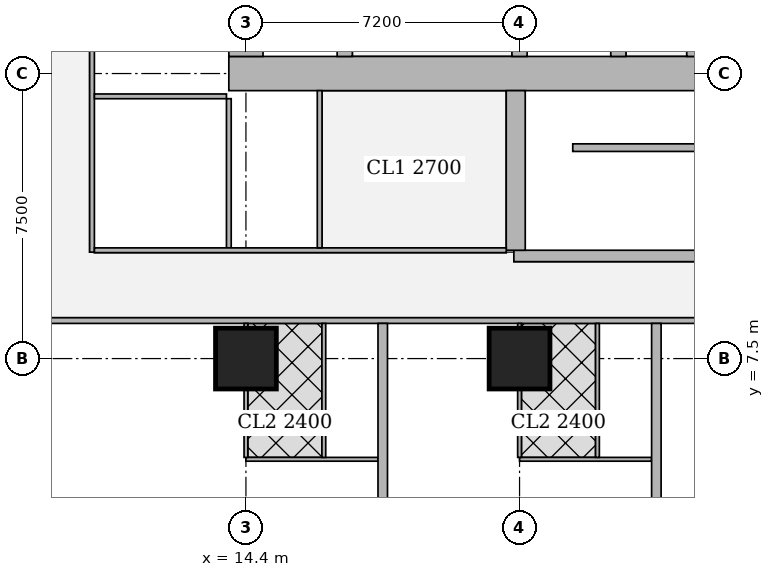
"""IFC4 building model, lengths in metres.
Left out: names, types, materials, properties, quantities, classifications, styles, units other than length and angle.
Written with IfcOpenShell. Run it as: python <this file> out.ifc"""

import sys

from ifc_helpers import new_model, si_unit, direction, frame, frame_2d, origin, origin_2d, place, context, subcontext, project, spatial, rectangle, extrude, element, fill, save


model = new_model("IFC4")
c1 = context("Model", 3, precision=1e-05, world=origin(), true_north=direction((0.0, 1.0)))
c2 = subcontext(c1, "Body", "Model", "MODEL_VIEW")
j1 = project(units=[si_unit("LENGTHUNIT", "METRE"), si_unit("PLANEANGLEUNIT", "RADIAN")], contexts=[c1])
p1 = place(None, origin())
s1 = spatial("IfcSite", under=j1, at=p1, CompositionType="ELEMENT")
p2 = place(p1, origin())
s2 = spatial("IfcBuilding", under=s1, at=p2, CompositionType="ELEMENT")
p3 = place(p2, frame((0.0, 0.0, 89.15)))
s3 = spatial("IfcBuildingStorey", under=s2, at=p3, CompositionType="ELEMENT", Elevation=89.15)
for number, where, z_axis, x_axis in (
    (1, (14.4, 7.5, 0.0), (0.0, 0.0, 1.0), (1.0, 0.0, 0.0)),
    (2, (21.6, 7.5, 0.0), (0.0, 0.0, 1.0), (1.0, 0.0, 0.0)),
):
    element("IfcColumn", number, at=place(p3, frame(where, z_axis=z_axis, x_axis=x_axis)), inside=s3, PredefinedType="COLUMN", context=c2, shape_type="SweptSolid", body=[
        extrude(rectangle(XDim=1.6, YDim=1.6, at=origin_2d()), origin(), (0.0, 0.0, 1.0), 3.75),
    ])
p4 = place(p3, frame((13.95, 15.0, 0.0), z_axis=(0.0, 0.0, 1.0), x_axis=(1.0, 0.0, 0.0)))
e3 = element("IfcWall", 3, at=p4, inside=s3, PredefinedType="SHEAR", context=c2, shape_type="SweptSolid", body=[
    extrude(rectangle(XDim=15.3, YDim=0.9, at=frame_2d((7.65, 0.0))), origin(), (0.0, 0.0, 1.0), 3.75),
])
p5 = place(p4, frame((4.45, 0.0, 0.0)))
e4 = element("IfcOpeningElement", 4, at=p5, cuts=e3, PredefinedType="OPENING", context=c2, shape_type="SweptSolid", body=[
    extrude(rectangle(XDim=1.8, YDim=2.1, at=frame_2d((0.9, 1.05))), frame((0.0, 0.46, 0.0), z_axis=(0.0, -1.0, 0.0), x_axis=(1.0, 0.0, 0.0)), (0.0, 0.0, 1.0), 0.92),
])
p6 = place(p4, frame((10.7, 0.0, 0.0)))
e5 = element("IfcOpeningElement", 5, at=p6, cuts=e3, PredefinedType="OPENING", context=c2, shape_type="SweptSolid", body=[
    extrude(rectangle(XDim=1.1, YDim=2.1, at=frame_2d((0.55, 1.05))), frame((0.0, 0.46, 0.0), z_axis=(0.0, -1.0, 0.0), x_axis=(1.0, 0.0, 0.0)), (0.0, 0.0, 1.0), 0.92),
])
p7 = place(p3, frame((14.4, 15.45, 0.0), z_axis=(0.0, 0.0, 1.0), x_axis=(0.0, 1.0, 0.0)))
e6 = element("IfcWall", 6, at=p7, inside=s3, PredefinedType="SHEAR", context=c2, shape_type="SweptSolid", body=[
    extrude(rectangle(XDim=14.1, YDim=0.9, at=frame_2d((7.05, 0.0))), origin(), (0.0, 0.0, 1.0), 3.75),
])
p8 = place(p3, frame((17.0, 15.45, 0.0), z_axis=(0.0, 0.0, 1.0), x_axis=(0.0, 1.0, 0.0)))
e7 = element("IfcWall", 7, at=p8, inside=s3, PredefinedType="SHEAR", context=c2, shape_type="SweptSolid", body=[
    extrude(rectangle(XDim=14.1, YDim=0.4, at=frame_2d((7.05, 0.0))), origin(), (0.0, 0.0, 1.0), 3.75),
])
p9 = place(p8, frame((0.875, 0.0, 0.0)))
e8 = element("IfcOpeningElement", 8, at=p9, cuts=e7, PredefinedType="OPENING", context=c2, shape_type="SweptSolid", body=[
    extrude(rectangle(XDim=1.1, YDim=2.1, at=frame_2d((0.55, 1.05))), frame((0.0, 0.21, 0.0), z_axis=(0.0, -1.0, 0.0), x_axis=(1.0, 0.0, 0.0)), (0.0, 0.0, 1.0), 0.42),
])
p10 = place(p8, frame((4.625, 0.0, 0.0)))
e9 = element("IfcOpeningElement", 9, at=p10, cuts=e7, PredefinedType="OPENING", context=c2, shape_type="SweptSolid", body=[
    extrude(rectangle(XDim=1.1, YDim=2.1, at=frame_2d((0.55, 1.05))), frame((0.0, 0.21, 0.0), z_axis=(0.0, -1.0, 0.0), x_axis=(1.0, 0.0, 0.0)), (0.0, 0.0, 1.0), 0.42),
])
p11 = place(p8, frame((8.375, 0.0, 0.0)))
e10 = element("IfcOpeningElement", 10, at=p11, cuts=e7, PredefinedType="OPENING", context=c2, shape_type="SweptSolid", body=[
    extrude(rectangle(XDim=1.1, YDim=2.1, at=frame_2d((0.55, 1.05))), frame((0.0, 0.21, 0.0), z_axis=(0.0, -1.0, 0.0), x_axis=(1.0, 0.0, 0.0)), (0.0, 0.0, 1.0), 0.42),
])
p12 = place(p8, frame((12.125, 0.0, 0.0)))
e11 = element("IfcOpeningElement", 11, at=p12, cuts=e7, PredefinedType="OPENING", context=c2, shape_type="SweptSolid", body=[
    extrude(rectangle(XDim=1.1, YDim=2.1, at=frame_2d((0.55, 1.05))), frame((0.0, 0.21, 0.0), z_axis=(0.0, -1.0, 0.0), x_axis=(1.0, 0.0, 0.0)), (0.0, 0.0, 1.0), 0.42),
])
for number, where, z_axis, x_axis in (
    (12, (21.6, 15.45, 0.0), (0.0, 0.0, 1.0), (0.0, 1.0, 0.0)),
    (13, (24.2, 15.45, 0.0), (0.0, 0.0, 1.0), (0.0, 1.0, 0.0)),
):
    element("IfcWall", number, at=place(p3, frame(where, z_axis=z_axis, x_axis=x_axis)), inside=s3, PredefinedType="SHEAR", context=c2, shape_type="SweptSolid", body=[
        extrude(rectangle(XDim=14.1, YDim=0.4, at=frame_2d((7.05, 0.0))), origin(), (0.0, 0.0, 1.0), 3.75),
    ])
p13 = place(p3, frame((26.2, 15.45, 0.0), z_axis=(0.0, 0.0, 1.0), x_axis=(0.0, 1.0, 0.0)))
e14 = element("IfcWall", 14, at=p13, inside=s3, PredefinedType="SHEAR", context=c2, shape_type="SweptSolid", body=[
    extrude(rectangle(XDim=3.1, YDim=0.4, at=frame_2d((1.55, 0.0))), origin(), (0.0, 0.0, 1.0), 3.75),
])
p14 = place(p13, frame((0.825, 0.0, 0.0)))
e15 = element("IfcOpeningElement", 15, at=p14, cuts=e14, PredefinedType="OPENING", context=c2, shape_type="SweptSolid", body=[
    extrude(rectangle(XDim=1.2, YDim=2.1, at=frame_2d((0.6, 1.05))), frame((0.0, 0.21, 0.0), z_axis=(0.0, -1.0, 0.0), x_axis=(1.0, 0.0, 0.0)), (0.0, 0.0, 1.0), 0.42),
])
p15 = place(p3, frame((21.45, 10.2, 0.0), z_axis=(0.0, 0.0, 1.0), x_axis=(1.0, 0.0, 0.0)))
e16 = element("IfcWall", 16, at=p15, inside=s3, PredefinedType="SHEAR", context=c2, shape_type="SweptSolid", body=[
    extrude(rectangle(XDim=7.5, YDim=0.3, at=frame_2d((3.75, 0.0))), origin(), (0.0, 0.0, 1.0), 3.75),
])
p16 = place(p15, frame((0.5, 0.0, 0.0)))
e17 = element("IfcOpeningElement", 17, at=p16, cuts=e16, PredefinedType="OPENING", context=c2, shape_type="SweptSolid", body=[
    extrude(rectangle(XDim=1.1, YDim=2.1, at=frame_2d((0.55, 1.05))), frame((0.0, 0.16, 0.0), z_axis=(0.0, -1.0, 0.0), x_axis=(1.0, 0.0, 0.0)), (0.0, 0.0, 1.0), 0.32),
])
p17 = place(p3, frame((21.5, 10.35, 0.0), z_axis=(0.0, 0.0, 1.0), x_axis=(0.0, 1.0, 0.0)))
e18 = element("IfcWall", 18, at=p17, inside=s3, PredefinedType="SHEAR", context=c2, shape_type="SweptSolid", body=[
    extrude(rectangle(XDim=4.2, YDim=0.5, at=frame_2d((2.1, 0.0))), origin(), (0.0, 0.0, 1.0), 3.75),
])
p18 = place(p3, frame((40.053, 8.5, 0.0), z_axis=(0.0, 0.0, 1.0), x_axis=(-1.0, 0.0, 0.0)))
e19 = element("IfcWall", 19, at=p18, inside=s3, PredefinedType="SOLIDWALL", context=c2, shape_type="SweptSolid", body=[
    extrude(rectangle(XDim=31.703, YDim=0.15, at=frame_2d((15.852, 0.0))), origin(), (0.0, 0.0, 1.0), 3.5),
])
p19 = place(p18, frame((28.103, 0.0, 0.0)))
e20 = element("IfcOpeningElement", 20, at=p19, cuts=e19, PredefinedType="OPENING", context=c2, shape_type="SweptSolid", body=[
    extrude(rectangle(XDim=1.0, YDim=2.1, at=frame_2d((0.5, 1.05))), frame((0.0, 0.085, 0.0), z_axis=(0.0, -1.0, 0.0), x_axis=(1.0, 0.0, 0.0)), (0.0, 0.0, 1.0), 0.17),
])
p20 = place(p18, frame((19.953, 0.0, 0.0)))
e21 = element("IfcOpeningElement", 21, at=p20, cuts=e19, PredefinedType="OPENING", context=c2, shape_type="SweptSolid", body=[
    extrude(rectangle(XDim=1.0, YDim=2.1, at=frame_2d((0.5, 1.05))), frame((0.0, 0.085, 0.0), z_axis=(0.0, -1.0, 0.0), x_axis=(1.0, 0.0, 0.0)), (0.0, 0.0, 1.0), 0.17),
])
p21 = place(p18, frame((12.753, 0.0, 0.0)))
e22 = element("IfcOpeningElement", 22, at=p21, cuts=e19, PredefinedType="OPENING", context=c2, shape_type="SweptSolid", body=[
    extrude(rectangle(XDim=1.0, YDim=2.1, at=frame_2d((0.5, 1.05))), frame((0.0, 0.085, 0.0), z_axis=(0.0, -1.0, 0.0), x_axis=(1.0, 0.0, 0.0)), (0.0, 0.0, 1.0), 0.17),
])
p22 = place(p18, frame((0.15, 0.0, 0.0)))
e23 = element("IfcOpeningElement", 23, at=p22, cuts=e19, PredefinedType="OPENING", context=c2, shape_type="SweptSolid", body=[
    extrude(rectangle(XDim=1.0, YDim=2.1, at=frame_2d((0.5, 1.05))), frame((0.0, 0.085, 0.0), z_axis=(0.0, -1.0, 0.0), x_axis=(1.0, 0.0, 0.0)), (0.0, 0.0, 1.0), 0.17),
])
p23 = place(p3, frame((17.875, 4.85, 0.0), z_axis=(0.0, 0.0, 1.0), x_axis=(-1.0, 0.0, 0.0)))
e24 = element("IfcWall", 24, at=p23, inside=s3, PredefinedType="PARTITIONING", context=c2, shape_type="SweptSolid", body=[
    extrude(rectangle(XDim=3.475, YDim=0.1, at=frame_2d((1.738, 0.0))), origin(), (0.0, 0.0, 1.0), 3.5),
])
p24 = place(p23, frame((2.0, 0.0, 0.0)))
e25 = element("IfcOpeningElement", 25, at=p24, cuts=e24, PredefinedType="OPENING", context=c2, shape_type="SweptSolid", body=[
    extrude(rectangle(XDim=0.9, YDim=2.1, at=frame_2d((0.45, 1.05))), frame((0.0, 0.06, 0.0), z_axis=(0.0, -1.0, 0.0), x_axis=(1.0, 0.0, 0.0)), (0.0, 0.0, 1.0), 0.12),
])
p25 = place(p23, frame((0.2, 0.0, 0.0)))
e26 = element("IfcOpeningElement", 26, at=p25, cuts=e24, PredefinedType="OPENING", context=c2, shape_type="SweptSolid", body=[
    extrude(rectangle(XDim=0.9, YDim=2.1, at=frame_2d((0.45, 1.05))), frame((0.0, 0.06, 0.0), z_axis=(0.0, -1.0, 0.0), x_axis=(1.0, 0.0, 0.0)), (0.0, 0.0, 1.0), 0.12),
])
p26 = place(p3, frame((14.4, 4.9, 0.0), z_axis=(0.0, 0.0, 1.0), x_axis=(0.0, 1.0, 0.0)))
e27 = element("IfcWall", 27, at=p26, inside=s3, PredefinedType="PARTITIONING", context=c2, shape_type="SweptSolid", body=[
    extrude(rectangle(XDim=1.799, YDim=0.1, at=frame_2d((0.899, 0.0))), origin(), (0.0, 0.0, 1.0), 3.5),
])
p27 = place(p3, frame((14.4, 8.301, 0.0), z_axis=(0.0, 0.0, 1.0), x_axis=(0.0, 1.0, 0.0)))
e28 = element("IfcWall", 28, at=p27, inside=s3, PredefinedType="PARTITIONING", context=c2, shape_type="SweptSolid", body=[
    extrude(rectangle(XDim=0.124, YDim=0.1, at=frame_2d((0.062, 0.0))), origin(), (0.0, 0.0, 1.0), 3.5),
])
p28 = place(p3, frame((16.45, 4.9, 0.0), z_axis=(0.0, 0.0, 1.0), x_axis=(0.0, 1.0, 0.0)))
e29 = element("IfcWall", 29, at=p28, inside=s3, PredefinedType="PARTITIONING", context=c2, shape_type="SweptSolid", body=[
    extrude(rectangle(XDim=3.525, YDim=0.1, at=frame_2d((1.763, 0.0))), origin(), (0.0, 0.0, 1.0), 3.5),
])
p29 = place(p3, frame((25.075, 4.85, 0.0), z_axis=(0.0, 0.0, 1.0), x_axis=(-1.0, 0.0, 0.0)))
e30 = element("IfcWall", 30, at=p29, inside=s3, PredefinedType="PARTITIONING", context=c2, shape_type="SweptSolid", body=[
    extrude(rectangle(XDim=3.475, YDim=0.1, at=frame_2d((1.737, 0.0))), origin(), (0.0, 0.0, 1.0), 3.5),
])
p30 = place(p29, frame((2.0, 0.0, 0.0)))
e31 = element("IfcOpeningElement", 31, at=p30, cuts=e30, PredefinedType="OPENING", context=c2, shape_type="SweptSolid", body=[
    extrude(rectangle(XDim=0.9, YDim=2.1, at=frame_2d((0.45, 1.05))), frame((0.0, 0.06, 0.0), z_axis=(0.0, -1.0, 0.0), x_axis=(1.0, 0.0, 0.0)), (0.0, 0.0, 1.0), 0.12),
])
p31 = place(p29, frame((0.2, 0.0, 0.0)))
e32 = element("IfcOpeningElement", 32, at=p31, cuts=e30, PredefinedType="OPENING", context=c2, shape_type="SweptSolid", body=[
    extrude(rectangle(XDim=0.9, YDim=2.1, at=frame_2d((0.45, 1.05))), frame((0.0, 0.06, 0.0), z_axis=(0.0, -1.0, 0.0), x_axis=(1.0, 0.0, 0.0)), (0.0, 0.0, 1.0), 0.12),
])
p32 = place(p3, frame((21.6, 4.9, 0.0), z_axis=(0.0, 0.0, 1.0), x_axis=(0.0, 1.0, 0.0)))
e33 = element("IfcWall", 33, at=p32, inside=s3, PredefinedType="PARTITIONING", context=c2, shape_type="SweptSolid", body=[
    extrude(rectangle(XDim=1.799, YDim=0.1, at=frame_2d((0.899, 0.0))), origin(), (0.0, 0.0, 1.0), 3.5),
])
p33 = place(p3, frame((21.6, 8.301, 0.0), z_axis=(0.0, 0.0, 1.0), x_axis=(0.0, 1.0, 0.0)))
e34 = element("IfcWall", 34, at=p33, inside=s3, PredefinedType="PARTITIONING", context=c2, shape_type="SweptSolid", body=[
    extrude(rectangle(XDim=0.124, YDim=0.1, at=frame_2d((0.062, 0.0))), origin(), (0.0, 0.0, 1.0), 3.5),
])
p34 = place(p3, frame((23.65, 4.9, 0.0), z_axis=(0.0, 0.0, 1.0), x_axis=(0.0, 1.0, 0.0)))
e35 = element("IfcWall", 35, at=p34, inside=s3, PredefinedType="PARTITIONING", context=c2, shape_type="SweptSolid", body=[
    extrude(rectangle(XDim=3.525, YDim=0.1, at=frame_2d((1.763, 0.0))), origin(), (0.0, 0.0, 1.0), 3.5),
])
for number, where, z_axis, x_axis in (
    (36, (18.0, 3.65, 0.0), (0.0, 0.0, 1.0), (0.0, 1.0, 0.0)),
    (37, (25.2, 3.65, 0.0), (0.0, 0.0, 1.0), (0.0, 1.0, 0.0)),
):
    element("IfcWall", number, at=place(p3, frame(where, z_axis=z_axis, x_axis=x_axis)), inside=s3, PredefinedType="SOLIDWALL", context=c2, shape_type="SweptSolid", body=[
        extrude(rectangle(XDim=4.775, YDim=0.25, at=frame_2d((2.388, 0.0))), origin(), (0.0, 0.0, 1.0), 3.5),
    ])
p35 = place(p3, frame((10.35, 10.3, 0.0), z_axis=(0.0, 0.0, 1.0), x_axis=(0.0, 1.0, 0.0)))
e38 = element("IfcWall", 38, at=p35, inside=s3, PredefinedType="PARTITIONING", context=c2, shape_type="SweptSolid", body=[
    extrude(rectangle(XDim=24.4, YDim=0.125, at=frame_2d((12.2, 0.0))), origin(), (0.0, 0.0, 1.0), 3.5),
])
p36 = place(p35, frame((1.55, 0.0, 0.0)))
e39 = element("IfcOpeningElement", 39, at=p36, cuts=e38, PredefinedType="OPENING", context=c2, shape_type="SweptSolid", body=[
    extrude(rectangle(XDim=1.0, YDim=2.1, at=frame_2d((0.5, 1.05))), frame((0.0, 0.073, 0.0), z_axis=(0.0, -1.0, 0.0), x_axis=(1.0, 0.0, 0.0)), (0.0, 0.0, 1.0), 0.145),
])
p37 = place(p35, frame((6.6, 0.0, 0.0)))
e40 = element("IfcOpeningElement", 40, at=p37, cuts=e38, PredefinedType="OPENING", context=c2, shape_type="SweptSolid", body=[
    extrude(rectangle(XDim=1.0, YDim=2.1, at=frame_2d((0.5, 1.05))), frame((0.0, 0.073, 0.0), z_axis=(0.0, -1.0, 0.0), x_axis=(1.0, 0.0, 0.0)), (0.0, 0.0, 1.0), 0.145),
])
p38 = place(p35, frame((11.4, 0.0, 0.0)))
e41 = element("IfcOpeningElement", 41, at=p38, cuts=e38, PredefinedType="OPENING", context=c2, shape_type="SweptSolid", body=[
    extrude(rectangle(XDim=1.0, YDim=2.1, at=frame_2d((0.5, 1.05))), frame((0.0, 0.073, 0.0), z_axis=(0.0, -1.0, 0.0), x_axis=(1.0, 0.0, 0.0)), (0.0, 0.0, 1.0), 0.145),
])
p39 = place(p35, frame((18.55, 0.0, 0.0)))
e42 = element("IfcOpeningElement", 42, at=p39, cuts=e38, PredefinedType="OPENING", context=c2, shape_type="SweptSolid", body=[
    extrude(rectangle(XDim=1.0, YDim=2.1, at=frame_2d((0.5, 1.05))), frame((0.0, 0.073, 0.0), z_axis=(0.0, -1.0, 0.0), x_axis=(1.0, 0.0, 0.0)), (0.0, 0.0, 1.0), 0.145),
])
p40 = place(p3, frame((10.413, 14.4, 0.0), z_axis=(0.0, 0.0, 1.0), x_axis=(1.0, 0.0, 0.0)))
e43 = element("IfcWall", 43, at=p40, inside=s3, PredefinedType="PARTITIONING", context=c2, shape_type="SweptSolid", body=[
    extrude(rectangle(XDim=3.475, YDim=0.125, at=frame_2d((1.737, 0.0))), origin(), (0.0, 0.0, 1.0), 3.5),
])
p41 = place(p3, frame((13.95, 10.413, 0.0), z_axis=(0.0, 0.0, 1.0), x_axis=(0.0, 1.0, 0.0)))
e44 = element("IfcWall", 44, at=p41, inside=s3, PredefinedType="PARTITIONING", context=c2, shape_type="SweptSolid", body=[
    extrude(rectangle(XDim=3.925, YDim=0.125, at=frame_2d((1.962, 0.0))), origin(), (0.0, 0.0, 1.0), 3.5),
])
p42 = place(p3, frame((10.413, 10.35, 0.0), z_axis=(0.0, 0.0, 1.0), x_axis=(1.0, 0.0, 0.0)))
e45 = element("IfcWall", 45, at=p42, inside=s3, PredefinedType="PARTITIONING", context=c2, shape_type="SweptSolid", body=[
    extrude(rectangle(XDim=10.837, YDim=0.125, at=frame_2d((5.418, 0.0))), origin(), (0.0, 0.0, 1.0), 3.5),
])
p43 = place(p42, frame((7.582, 0.0, 0.0)))
e46 = element("IfcOpeningElement", 46, at=p43, cuts=e45, PredefinedType="OPENING", context=c2, shape_type="SweptSolid", body=[
    extrude(rectangle(XDim=1.8, YDim=2.1, at=frame_2d((0.9, 1.05))), frame((0.0, 0.073, 0.0), z_axis=(0.0, -1.0, 0.0), x_axis=(1.0, 0.0, 0.0)), (0.0, 0.0, 1.0), 0.145),
])
p44 = place(p3, frame((16.34, 10.413, 0.0), z_axis=(0.0, 0.0, 1.0), x_axis=(0.0, 1.0, 0.0)))
e47 = element("IfcWall", 47, at=p44, inside=s3, PredefinedType="PARTITIONING", context=c2, shape_type="SweptSolid", body=[
    extrude(rectangle(XDim=4.137, YDim=0.125, at=frame_2d((2.068, 0.0))), origin(), (0.0, 0.0, 1.0), 3.5),
])
p45 = place(p44, frame((1.512, 0.0, 0.0)))
e48 = element("IfcOpeningElement", 48, at=p45, cuts=e47, PredefinedType="OPENING", context=c2, shape_type="SweptSolid", body=[
    extrude(rectangle(XDim=1.0, YDim=2.1, at=frame_2d((0.5, 1.05))), frame((0.0, 0.073, 0.0), z_axis=(0.0, -1.0, 0.0), x_axis=(1.0, 0.0, 0.0)), (0.0, 0.0, 1.0), 0.145),
])
p46 = place(p3, frame((23.0, 13.05, 0.0), z_axis=(0.0, 0.0, 1.0), x_axis=(1.0, 0.0, 0.0)))
e49 = element("IfcWall", 49, at=p46, inside=s3, PredefinedType="SHEAR", context=c2, shape_type="SweptSolid", body=[
    extrude(rectangle(XDim=5.8, YDim=0.2, at=frame_2d((2.9, 0.0))), origin(), (0.0, 0.0, 1.0), 3.75),
])
p47 = place(p24, origin())
e50 = element("IfcDoor", 50, at=p47, inside=s3, OperationType="SINGLE_SWING_LEFT", PredefinedType="DOOR", context=c2, shape_type="SweptSolid", body=[
    extrude(rectangle(XDim=0.9, YDim=2.1, at=frame_2d((0.45, 1.05))), frame((0.0, 0.025, 0.0), z_axis=(0.0, -1.0, 0.0), x_axis=(1.0, 0.0, 0.0)), (0.0, 0.0, 1.0), 0.05),
])
fill(e25, e50)
p48 = place(p25, origin())
e51 = element("IfcDoor", 51, at=p48, inside=s3, OperationType="SINGLE_SWING_RIGHT", PredefinedType="DOOR", context=c2, shape_type="SweptSolid", body=[
    extrude(rectangle(XDim=0.9, YDim=2.1, at=frame_2d((0.45, 1.05))), frame((0.0, 0.025, 0.0), z_axis=(0.0, -1.0, 0.0), x_axis=(1.0, 0.0, 0.0)), (0.0, 0.0, 1.0), 0.05),
])
fill(e26, e51)
p49 = place(p19, origin())
e52 = element("IfcDoor", 52, at=p49, inside=s3, OperationType="SINGLE_SWING_RIGHT", PredefinedType="DOOR", context=c2, shape_type="SweptSolid", body=[
    extrude(rectangle(XDim=1.0, YDim=2.1, at=frame_2d((0.5, 1.05))), frame((0.0, 0.025, 0.0), z_axis=(0.0, -1.0, 0.0), x_axis=(1.0, 0.0, 0.0)), (0.0, 0.0, 1.0), 0.05),
])
fill(e20, e52)
p50 = place(p30, origin())
e53 = element("IfcDoor", 53, at=p50, inside=s3, OperationType="SINGLE_SWING_LEFT", PredefinedType="DOOR", context=c2, shape_type="SweptSolid", body=[
    extrude(rectangle(XDim=0.9, YDim=2.1, at=frame_2d((0.45, 1.05))), frame((0.0, 0.025, 0.0), z_axis=(0.0, -1.0, 0.0), x_axis=(1.0, 0.0, 0.0)), (0.0, 0.0, 1.0), 0.05),
])
fill(e31, e53)
p51 = place(p31, origin())
e54 = element("IfcDoor", 54, at=p51, inside=s3, OperationType="SINGLE_SWING_RIGHT", PredefinedType="DOOR", context=c2, shape_type="SweptSolid", body=[
    extrude(rectangle(XDim=0.9, YDim=2.1, at=frame_2d((0.45, 1.05))), frame((0.0, 0.025, 0.0), z_axis=(0.0, -1.0, 0.0), x_axis=(1.0, 0.0, 0.0)), (0.0, 0.0, 1.0), 0.05),
])
fill(e32, e54)
p52 = place(p20, origin())
e55 = element("IfcDoor", 55, at=p52, inside=s3, OperationType="SINGLE_SWING_RIGHT", PredefinedType="DOOR", context=c2, shape_type="SweptSolid", body=[
    extrude(rectangle(XDim=1.0, YDim=2.1, at=frame_2d((0.5, 1.05))), frame((0.0, 0.025, 0.0), z_axis=(0.0, -1.0, 0.0), x_axis=(1.0, 0.0, 0.0)), (0.0, 0.0, 1.0), 0.05),
])
fill(e21, e55)
p53 = place(p36, origin())
e56 = element("IfcDoor", 56, at=p53, inside=s3, OperationType="SINGLE_SWING_RIGHT", PredefinedType="DOOR", context=c2, shape_type="SweptSolid", body=[
    extrude(rectangle(XDim=1.0, YDim=2.1, at=frame_2d((0.5, 1.05))), frame((0.0, 0.025, 0.0), z_axis=(0.0, -1.0, 0.0), x_axis=(1.0, 0.0, 0.0)), (0.0, 0.0, 1.0), 0.05),
])
fill(e39, e56)
p54 = place(p45, origin())
e57 = element("IfcDoor", 57, at=p54, inside=s3, OperationType="SINGLE_SWING_LEFT", PredefinedType="DOOR", context=c2, shape_type="SweptSolid", body=[
    extrude(rectangle(XDim=1.0, YDim=2.1, at=frame_2d((0.5, 1.05))), frame((0.0, 0.025, 0.0), z_axis=(0.0, -1.0, 0.0), x_axis=(1.0, 0.0, 0.0)), (0.0, 0.0, 1.0), 0.05),
])
fill(e48, e57)
p55 = place(p43, origin())
e58 = element("IfcDoor", 58, at=p55, inside=s3, OperationType="DOUBLE_DOOR_SINGLE_SWING", PredefinedType="DOOR", context=c2, shape_type="SweptSolid", body=[
    extrude(rectangle(XDim=1.8, YDim=2.1, at=frame_2d((0.9, 1.05))), frame((0.0, 0.025, 0.0), z_axis=(0.0, -1.0, 0.0), x_axis=(1.0, 0.0, 0.0)), (0.0, 0.0, 1.0), 0.05),
])
fill(e46, e58)
p56 = place(p5, origin())
e59 = element("IfcDoor", 59, at=p56, inside=s3, OperationType="DOUBLE_DOOR_SINGLE_SWING", PredefinedType="DOOR", context=c2, shape_type="SweptSolid", body=[
    extrude(rectangle(XDim=1.8, YDim=2.1, at=frame_2d((0.9, 1.05))), frame((0.0, 0.025, 0.0), z_axis=(0.0, -1.0, 0.0), x_axis=(1.0, 0.0, 0.0)), (0.0, 0.0, 1.0), 0.05),
])
fill(e4, e59)
p57 = place(p6, origin())
e60 = element("IfcDoor", 60, at=p57, inside=s3, OperationType="SINGLE_SWING_LEFT", PredefinedType="DOOR", context=c2, shape_type="SweptSolid", body=[
    extrude(rectangle(XDim=1.1, YDim=2.1, at=frame_2d((0.55, 1.05))), frame((0.0, 0.025, 0.0), z_axis=(0.0, -1.0, 0.0), x_axis=(1.0, 0.0, 0.0)), (0.0, 0.0, 1.0), 0.05),
])
fill(e5, e60)
p58 = place(p16, origin())
e61 = element("IfcDoor", 61, at=p58, inside=s3, OperationType="SINGLE_SWING_LEFT", PredefinedType="DOOR", context=c2, shape_type="SweptSolid", body=[
    extrude(rectangle(XDim=1.1, YDim=2.1, at=frame_2d((0.55, 1.05))), frame((0.0, 0.025, 0.0), z_axis=(0.0, -1.0, 0.0), x_axis=(1.0, 0.0, 0.0)), (0.0, 0.0, 1.0), 0.05),
])
fill(e17, e61)
save(model, sys.argv[1])
